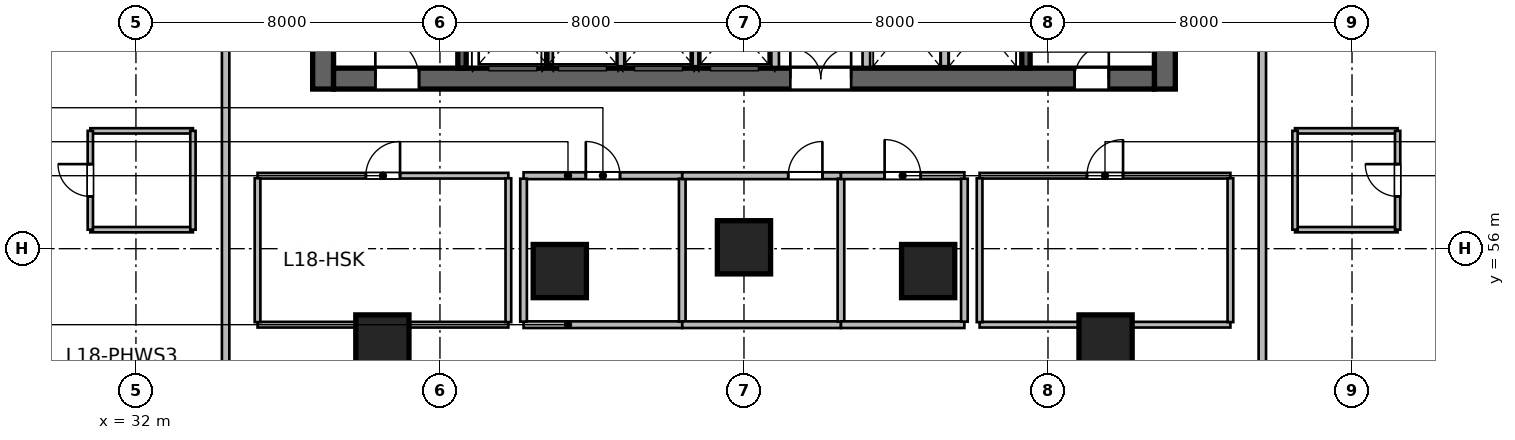
"""IFC4 building model, lengths in metres.
Left out: names, types, materials, properties, quantities, classifications, styles, units other than length and angle.
Written with IfcOpenShell. Run it as: python <this file> out.ifc"""

import sys

from ifc_helpers import new_model, si_unit, direction, frame, frame_2d, origin, origin_2d, place, context, subcontext, project, spatial, rectangle, circle, extrude, source, transform, mapped, element, fill, save


model = new_model("IFC4")
c1 = context("Model", 3, precision=1e-05, world=origin(), true_north=direction((0.0, 1.0)))
c2 = subcontext(c1, "Body", "Model", "MODEL_VIEW")
j1 = project(units=[si_unit("LENGTHUNIT", "METRE"), si_unit("PLANEANGLEUNIT", "RADIAN")], contexts=[c1])
p1 = place(None, origin())
s1 = spatial("IfcSite", under=j1, at=p1, CompositionType="ELEMENT")
p2 = place(p1, origin())
s2 = spatial("IfcBuilding", under=s1, at=p2, CompositionType="ELEMENT")
p3 = place(p2, frame((0.0, 0.0, 78.6)))
s3 = spatial("IfcBuildingStorey", under=s2, at=p3, CompositionType="ELEMENT", Elevation=78.6)
m1 = source(origin(), c2, "Body", "SweptSolid", [
    extrude(rectangle(XDim=12.0, YDim=0.55, at=frame_2d((6.0, 0.0))), origin(), (0.0, 0.0, 1.0), 3.6),
])
for number, where, z_axis, x_axis in (
    (1, (36.925, 60.2, 0.0), (0.0, 0.0, 1.0), (0.0, 1.0, 0.0)),
    (2, (59.075, 60.2, 0.0), (0.0, 0.0, 1.0), (0.0, 1.0, 0.0)),
):
    element("IfcWall", number, at=place(p3, frame(where, z_axis=z_axis, x_axis=x_axis)), inside=s3, PredefinedType="SHEAR", context=c2, shape_type="MappedRepresentation", body=[
        mapped(m1, transform((0.0, 0.0, 0.0), scale=1.0)),
    ])
m2 = source(origin(), c2, "Body", "SweptSolid", [
    extrude(rectangle(XDim=21.6, YDim=0.55, at=frame_2d((10.8, 0.0))), origin(), (0.0, 0.0, 1.0), 3.6),
])
p4 = place(p3, frame((37.2, 60.475, 0.0), z_axis=(0.0, 0.0, 1.0), x_axis=(1.0, 0.0, 0.0)))
e3 = element("IfcWall", 3, at=p4, inside=s3, PredefinedType="SHEAR", context=c2, shape_type="MappedRepresentation", body=[
    mapped(m2, transform((0.0, 0.0, 0.0), scale=1.0)),
])
p5 = place(p4, frame((1.1, 0.0, 0.0)))
e4 = element("IfcOpeningElement", 4, at=p5, cuts=e3, PredefinedType="OPENING", context=c2, shape_type="SweptSolid", body=[
    extrude(rectangle(XDim=1.15, YDim=2.15, at=frame_2d((0.575, 1.075))), frame((0.0, 0.285, 0.0), z_axis=(0.0, -1.0, 0.0), x_axis=(1.0, 0.0, 0.0)), (0.0, 0.0, 1.0), 0.57),
])
p6 = place(p4, frame((19.5, 0.0, 0.0)))
e5 = element("IfcOpeningElement", 5, at=p6, cuts=e3, PredefinedType="OPENING", context=c2, shape_type="SweptSolid", body=[
    extrude(rectangle(XDim=0.9, YDim=2.1, at=frame_2d((0.45, 1.05))), frame((0.0, 0.285, 0.0), z_axis=(0.0, -1.0, 0.0), x_axis=(1.0, 0.0, 0.0)), (0.0, 0.0, 1.0), 0.57),
])
p7 = place(p4, frame((12.02, 0.0, 0.0)))
e6 = element("IfcOpeningElement", 6, at=p7, cuts=e3, PredefinedType="OPENING", context=c2, shape_type="SweptSolid", body=[
    extrude(rectangle(XDim=1.6, YDim=2.15, at=frame_2d((0.8, 1.075))), frame((0.0, 0.285, 0.0), z_axis=(0.0, -1.0, 0.0), x_axis=(1.0, 0.0, 0.0)), (0.0, 0.0, 1.0), 0.57),
])
m3 = source(origin(), c2, "Body", "SweptSolid", [
    extrude(rectangle(XDim=10.9, YDim=0.22, at=frame_2d((5.45, 0.0))), origin(), (0.0, 0.0, 1.0), 3.6),
])
p8 = place(p3, frame((40.58, 60.75, 0.0), z_axis=(0.0, 0.0, 1.0), x_axis=(0.0, 1.0, 0.0)))
e7 = element("IfcWall", 7, at=p8, inside=s3, PredefinedType="SHEAR", context=c2, shape_type="MappedRepresentation", body=[
    mapped(m3, transform((0.0, 0.0, 0.0), scale=1.0)),
])
p9 = place(p3, frame((55.42, 60.75, 0.0), z_axis=(0.0, 0.0, 1.0), x_axis=(0.0, 1.0, 0.0)))
e8 = element("IfcWall", 8, at=p9, inside=s3, PredefinedType="SHEAR", context=c2, shape_type="MappedRepresentation", body=[
    mapped(m3, transform((0.0, 0.0, 0.0), scale=1.0)),
])
p10 = place(p9, frame((9.495, 0.0, 0.0)))
e9 = element("IfcOpeningElement", 9, at=p10, cuts=e8, PredefinedType="OPENING", context=c2, shape_type="SweptSolid", body=[
    extrude(rectangle(XDim=1.15, YDim=2.15, at=frame_2d((0.575, 1.075))), frame((0.0, 0.12, 0.0), z_axis=(0.0, -1.0, 0.0), x_axis=(1.0, 0.0, 0.0)), (0.0, 0.0, 1.0), 0.24),
])
m4 = source(origin(), c2, "Body", "SweptSolid", [
    extrude(circle(Radius=0.7, at=origin_2d()), origin(), (0.0, 0.0, 1.0), 3.6),
])
for number, where, z_axis, x_axis in (
    (10, (38.485, 53.558, 0.0), (0.0, 0.0, 1.0), (-0.289, 0.957, 0.0)),
    (11, (43.154, 55.411, 0.0), (0.0, 0.0, 1.0), (-0.143, 0.99, 0.0)),
    (12, (48.0, 56.036, 0.0), (0.0, 0.0, 1.0), (0.0, 1.0, 0.0)),
    (13, (52.846, 55.411, 0.0), (0.0, 0.0, 1.0), (0.143, 0.99, 0.0)),
    (14, (57.515, 53.558, 0.0), (0.0, 0.0, 1.0), (0.289, 0.957, 0.0)),
):
    element("IfcColumn", number, at=place(p3, frame(where, z_axis=z_axis, x_axis=x_axis)), inside=s3, PredefinedType="COLUMN", context=c2, shape_type="MappedRepresentation", body=[
        mapped(m4, transform((0.0, 0.0, 0.0), scale=1.0)),
    ])
m5 = source(origin(), c2, "Body", "SweptSolid", [
    extrude(rectangle(XDim=2.24, YDim=0.2, at=frame_2d((1.12, 0.0))), origin(), (0.0, 0.0, 1.0), 3.36),
])
for number, where, z_axis, x_axis in (
    (15, (48.82, 60.78, 0.0), (0.0, 0.0, 1.0), (0.0, 1.0, 0.0)),
    (16, (51.22, 60.78, 0.0), (0.0, 0.0, 1.0), (0.0, 1.0, 0.0)),
):
    element("IfcWall", number, at=place(p3, frame(where, z_axis=z_axis, x_axis=x_axis)), inside=s3, PredefinedType="SOLIDWALL", context=c2, shape_type="MappedRepresentation", body=[
        mapped(m5, transform((0.0, 0.0, 0.0), scale=1.0)),
    ])
m6 = source(origin(), c2, "Body", "SweptSolid", [
    extrude(rectangle(XDim=2.2, YDim=0.2, at=frame_2d((1.1, 0.0))), origin(), (0.0, 0.0, 1.0), 3.36),
])
for number, where, z_axis, x_axis in (
    (17, (42.87, 60.8, 0.0), (0.0, 0.0, 1.0), (0.0, 1.0, 0.0)),
    (18, (44.77, 60.8, 0.0), (0.0, 0.0, 1.0), (0.0, 1.0, 0.0)),
    (19, (46.7, 60.8, 0.0), (0.0, 0.0, 1.0), (0.0, 1.0, 0.0)),
    (20, (53.28, 60.8, 0.0), (0.0, 0.0, 1.0), (0.0, 1.0, 0.0)),
):
    element("IfcWall", number, at=place(p3, frame(where, z_axis=z_axis, x_axis=x_axis)), inside=s3, PredefinedType="SOLIDWALL", context=c2, shape_type="MappedRepresentation", body=[
        mapped(m6, transform((0.0, 0.0, 0.0), scale=1.0)),
    ])
m7 = source(origin(), c2, "Body", "SweptSolid", [
    extrude(rectangle(XDim=6.6, YDim=0.15, at=frame_2d((3.3, 0.0))), origin(), (0.0, 0.0, 1.0), 2.803),
])
p11 = place(p3, frame((35.2, 54.0, 0.0), z_axis=(0.0, 0.0, 1.0), x_axis=(1.0, 0.0, 0.0)))
e21 = element("IfcWall", 21, at=p11, inside=s3, PredefinedType="PARTITIONING", context=c2, shape_type="MappedRepresentation", body=[
    mapped(m7, transform((0.0, 0.0, 0.0), scale=1.0)),
])
m8 = source(origin(), c2, "Body", "SweptSolid", [
    extrude(rectangle(XDim=6.6, YDim=0.15, at=frame_2d((3.3, 0.0))), origin(), (0.0, 0.0, 1.0), 3.36),
])
p12 = place(p3, frame((35.2, 57.92, 0.0), z_axis=(0.0, 0.0, 1.0), x_axis=(1.0, 0.0, 0.0)))
e22 = element("IfcWall", 22, at=p12, inside=s3, PredefinedType="PARTITIONING", context=c2, shape_type="MappedRepresentation", body=[
    mapped(m8, transform((0.0, 0.0, 0.0), scale=1.0)),
])
p13 = place(p12, frame((2.85, 0.0, 0.0)))
e23 = element("IfcOpeningElement", 23, at=p13, cuts=e22, PredefinedType="OPENING", context=c2, shape_type="SweptSolid", body=[
    extrude(rectangle(XDim=0.9, YDim=2.1, at=frame_2d((0.45, 1.05))), frame((0.0, 0.085, 0.0), z_axis=(0.0, -1.0, 0.0), x_axis=(1.0, 0.0, 0.0)), (0.0, 0.0, 1.0), 0.17),
])
m9 = source(origin(), c2, "Body", "SweptSolid", [
    extrude(rectangle(XDim=3.785, YDim=0.15, at=frame_2d((1.893, 0.0))), origin(), (0.0, 0.0, 1.0), 3.36),
])
for number, where, z_axis, x_axis in (
    (24, (35.2, 54.067, 0.0), (0.0, 0.0, 1.0), (0.0, 1.0, 0.0)),
    (25, (41.8, 54.067, 0.0), (0.0, 0.0, 1.0), (0.0, 1.0, 0.0)),
):
    element("IfcWall", number, at=place(p3, frame(where, z_axis=z_axis, x_axis=x_axis)), inside=s3, PredefinedType="PARTITIONING", context=c2, shape_type="MappedRepresentation", body=[
        mapped(m9, transform((0.0, 0.0, 0.0), scale=1.0)),
    ])
m10 = source(origin(), c2, "Body", "SweptSolid", [
    extrude(rectangle(XDim=4.176, YDim=0.175, at=frame_2d((2.088, 0.0))), origin(), (0.0, 0.0, 1.0), 3.36),
])
p14 = place(p3, frame((42.2, 54.0, 0.0), z_axis=(0.0, 0.0, 1.0), x_axis=(1.0, 0.0, 0.0)))
e26 = element("IfcWall", 26, at=p14, inside=s3, PredefinedType="PARTITIONING", context=c2, shape_type="MappedRepresentation", body=[
    mapped(m10, transform((0.0, 0.0, 0.0), scale=1.0)),
])
m11 = source(origin(), c2, "Body", "SweptSolid", [
    extrude(rectangle(XDim=4.176, YDim=0.18, at=frame_2d((2.088, 0.0))), origin(), (0.0, 0.0, 1.0), 3.36),
])
p15 = place(p3, frame((42.2, 57.92, 0.0), z_axis=(0.0, 0.0, 1.0), x_axis=(1.0, 0.0, 0.0)))
e27 = element("IfcWall", 27, at=p15, inside=s3, PredefinedType="PLUMBINGWALL", context=c2, shape_type="MappedRepresentation", body=[
    mapped(m11, transform((0.0, 0.0, 0.0), scale=1.0)),
])
p16 = place(p15, frame((1.638, 0.0, 0.0)))
e28 = element("IfcOpeningElement", 28, at=p16, cuts=e27, PredefinedType="OPENING", context=c2, shape_type="SweptSolid", body=[
    extrude(rectangle(XDim=0.9, YDim=2.08, at=frame_2d((0.45, 1.04))), frame((0.0, 0.1, 0.0), z_axis=(0.0, -1.0, 0.0), x_axis=(1.0, 0.0, 0.0)), (0.0, 0.0, 1.0), 0.2),
])
m12 = source(origin(), c2, "Body", "SweptSolid", [
    extrude(rectangle(XDim=3.763, YDim=0.175, at=frame_2d((1.881, 0.0))), origin(), (0.0, 0.0, 1.0), 3.36),
])
for number, where, z_axis, x_axis in (
    (29, (42.2, 54.079, 0.0), (0.0, 0.0, 1.0), (0.0, 1.0, 0.0)),
    (30, (46.376, 54.079, 0.0), (0.0, 0.0, 1.0), (0.0, 1.0, 0.0)),
):
    element("IfcWall", number, at=place(p3, frame(where, z_axis=z_axis, x_axis=x_axis)), inside=s3, PredefinedType="PARTITIONING", context=c2, shape_type="MappedRepresentation", body=[
        mapped(m12, transform((0.0, 0.0, 0.0), scale=1.0)),
    ])
p17 = place(p3, frame((46.376, 54.0, 0.0), z_axis=(0.0, 0.0, 1.0), x_axis=(1.0, 0.0, 0.0)))
e31 = element("IfcWall", 31, at=p17, inside=s3, PredefinedType="PARTITIONING", context=c2, shape_type="MappedRepresentation", body=[
    mapped(m10, transform((0.0, 0.0, 0.0), scale=1.0)),
])
p18 = place(p3, frame((46.376, 57.92, 0.0), z_axis=(0.0, 0.0, 1.0), x_axis=(1.0, 0.0, 0.0)))
e32 = element("IfcWall", 32, at=p18, inside=s3, PredefinedType="PLUMBINGWALL", context=c2, shape_type="MappedRepresentation", body=[
    mapped(m11, transform((0.0, 0.0, 0.0), scale=1.0)),
])
p19 = place(p18, frame((2.788, 0.0, 0.0)))
e33 = element("IfcOpeningElement", 33, at=p19, cuts=e32, PredefinedType="OPENING", context=c2, shape_type="SweptSolid", body=[
    extrude(rectangle(XDim=0.9, YDim=2.08, at=frame_2d((0.45, 1.04))), frame((0.0, 0.1, 0.0), z_axis=(0.0, -1.0, 0.0), x_axis=(1.0, 0.0, 0.0)), (0.0, 0.0, 1.0), 0.2),
])
p20 = place(p3, frame((50.552, 54.079, 0.0), z_axis=(0.0, 0.0, 1.0), x_axis=(0.0, 1.0, 0.0)))
e34 = element("IfcWall", 34, at=p20, inside=s3, PredefinedType="PARTITIONING", context=c2, shape_type="MappedRepresentation", body=[
    mapped(m12, transform((0.0, 0.0, 0.0), scale=1.0)),
])
m13 = source(origin(), c2, "Body", "SweptSolid", [
    extrude(rectangle(XDim=3.248, YDim=0.175, at=frame_2d((1.624, 0.0))), origin(), (0.0, 0.0, 1.0), 3.36),
])
p21 = place(p3, frame((50.552, 54.0, 0.0), z_axis=(0.0, 0.0, 1.0), x_axis=(1.0, 0.0, 0.0)))
e35 = element("IfcWall", 35, at=p21, inside=s3, PredefinedType="PARTITIONING", context=c2, shape_type="MappedRepresentation", body=[
    mapped(m13, transform((0.0, 0.0, 0.0), scale=1.0)),
])
m14 = source(origin(), c2, "Body", "SweptSolid", [
    extrude(rectangle(XDim=3.248, YDim=0.18, at=frame_2d((1.624, 0.0))), origin(), (0.0, 0.0, 1.0), 3.36),
])
p22 = place(p3, frame((50.552, 57.92, 0.0), z_axis=(0.0, 0.0, 1.0), x_axis=(1.0, 0.0, 0.0)))
e36 = element("IfcWall", 36, at=p22, inside=s3, PredefinedType="PLUMBINGWALL", context=c2, shape_type="MappedRepresentation", body=[
    mapped(m14, transform((0.0, 0.0, 0.0), scale=1.0)),
])
p23 = place(p22, frame((1.149, 0.0, 0.0)))
e37 = element("IfcOpeningElement", 37, at=p23, cuts=e36, PredefinedType="OPENING", context=c2, shape_type="SweptSolid", body=[
    extrude(rectangle(XDim=0.95, YDim=2.12, at=frame_2d((0.475, 1.06))), frame((0.0, 0.1, 0.0), z_axis=(0.0, -1.0, 0.0), x_axis=(1.0, 0.0, 0.0)), (0.0, 0.0, 1.0), 0.2),
])
p24 = place(p3, frame((53.8, 54.079, 0.0), z_axis=(0.0, 0.0, 1.0), x_axis=(0.0, 1.0, 0.0)))
e38 = element("IfcWall", 38, at=p24, inside=s3, PredefinedType="PARTITIONING", context=c2, shape_type="MappedRepresentation", body=[
    mapped(m12, transform((0.0, 0.0, 0.0), scale=1.0)),
])
p25 = place(p3, frame((54.2, 54.0, 0.0), z_axis=(0.0, 0.0, 1.0), x_axis=(1.0, 0.0, 0.0)))
e39 = element("IfcWall", 39, at=p25, inside=s3, PredefinedType="PARTITIONING", context=c2, shape_type="MappedRepresentation", body=[
    mapped(m7, transform((0.0, 0.0, 0.0), scale=1.0)),
])
p26 = place(p3, frame((54.2, 57.92, 0.0), z_axis=(0.0, 0.0, 1.0), x_axis=(1.0, 0.0, 0.0)))
e40 = element("IfcWall", 40, at=p26, inside=s3, PredefinedType="PARTITIONING", context=c2, shape_type="MappedRepresentation", body=[
    mapped(m8, transform((0.0, 0.0, 0.0), scale=1.0)),
])
p27 = place(p26, frame((2.825, 0.0, 0.0)))
e41 = element("IfcOpeningElement", 41, at=p27, cuts=e40, PredefinedType="OPENING", context=c2, shape_type="SweptSolid", body=[
    extrude(rectangle(XDim=0.95, YDim=2.1, at=frame_2d((0.475, 1.05))), frame((0.0, 0.085, 0.0), z_axis=(0.0, -1.0, 0.0), x_axis=(1.0, 0.0, 0.0)), (0.0, 0.0, 1.0), 0.17),
])
for number, where, z_axis, x_axis in (
    (42, (54.2, 54.067, 0.0), (0.0, 0.0, 1.0), (0.0, 1.0, 0.0)),
    (43, (60.8, 54.067, 0.0), (0.0, 0.0, 1.0), (0.0, 1.0, 0.0)),
):
    element("IfcWall", number, at=place(p3, frame(where, z_axis=z_axis, x_axis=x_axis)), inside=s3, PredefinedType="PARTITIONING", context=c2, shape_type="MappedRepresentation", body=[
        mapped(m9, transform((0.0, 0.0, 0.0), scale=1.0)),
    ])
m15 = source(origin(), c2, "Body", "SweptSolid", [
    extrude(rectangle(XDim=16.134, YDim=0.195, at=frame_2d((8.067, 0.0))), origin(), (0.0, 0.0, 1.0), 3.36),
])
p28 = place(p3, frame((34.36, 45.326, 0.0), z_axis=(0.0, 0.0, 1.0), x_axis=(0.0, 1.0, 0.0)))
e44 = element("IfcWall", 44, at=p28, inside=s3, PredefinedType="PARTITIONING", context=c2, shape_type="MappedRepresentation", body=[
    mapped(m15, transform((0.0, 0.0, 0.0), scale=1.0)),
])
m16 = source(origin(), c2, "Body", "SweptSolid", [
    extrude(rectangle(XDim=16.134, YDim=0.195, at=frame_2d((8.067, 0.0))), origin(), (0.0, 0.0, 1.0), 2.644),
])
p29 = place(p3, frame((61.64, 45.326, 0.0), z_axis=(0.0, 0.0, 1.0), x_axis=(0.0, 1.0, 0.0)))
e45 = element("IfcWall", 45, at=p29, inside=s3, PredefinedType="PARTITIONING", context=c2, shape_type="MappedRepresentation", body=[
    mapped(m16, transform((0.0, 0.0, 0.0), scale=1.0)),
])
m17 = source(origin(), c2, "Body", "SweptSolid", [
    extrude(rectangle(XDim=2.7, YDim=0.14, at=frame_2d((1.35, 0.0))), origin(), (0.0, 0.0, 1.0), 3.36),
])
for number, where, z_axis, x_axis in (
    (46, (30.8, 59.1, 0.0), (0.0, 0.0, 1.0), (1.0, 0.0, 0.0)),
    (47, (30.8, 56.5, 0.0), (0.0, 0.0, 1.0), (1.0, 0.0, 0.0)),
):
    element("IfcWall", number, at=place(p3, frame(where, z_axis=z_axis, x_axis=x_axis)), inside=s3, PredefinedType="PARTITIONING", context=c2, shape_type="MappedRepresentation", body=[
        mapped(m17, transform((0.0, 0.0, 0.0), scale=1.0)),
    ])
m18 = source(origin(), c2, "Body", "SweptSolid", [
    extrude(rectangle(XDim=2.6, YDim=0.14, at=frame_2d((1.3, 0.0))), origin(), (0.0, 0.0, 1.0), 2.644),
])
p30 = place(p3, frame((30.8, 56.5, 0.0), z_axis=(0.0, 0.0, 1.0), x_axis=(0.0, 1.0, 0.0)))
e48 = element("IfcWall", 48, at=p30, inside=s3, PredefinedType="PARTITIONING", context=c2, shape_type="MappedRepresentation", body=[
    mapped(m18, transform((0.0, 0.0, 0.0), scale=1.0)),
])
p31 = place(p30, frame((0.875, 0.0, 0.0)))
e49 = element("IfcOpeningElement", 49, at=p31, cuts=e48, PredefinedType="OPENING", context=c2, shape_type="SweptSolid", body=[
    extrude(rectangle(XDim=0.85, YDim=2.05, at=frame_2d((0.425, 1.025))), frame((0.0, 0.08, 0.0), z_axis=(0.0, -1.0, 0.0), x_axis=(1.0, 0.0, 0.0)), (0.0, 0.0, 1.0), 0.16),
])
m19 = source(origin(), c2, "Body", "SweptSolid", [
    extrude(rectangle(XDim=2.6, YDim=0.14, at=frame_2d((1.3, 0.0))), origin(), (0.0, 0.0, 1.0), 3.36),
])
p32 = place(p3, frame((33.5, 56.5, 0.0), z_axis=(0.0, 0.0, 1.0), x_axis=(0.0, 1.0, 0.0)))
e50 = element("IfcWall", 50, at=p32, inside=s3, PredefinedType="PARTITIONING", context=c2, shape_type="MappedRepresentation", body=[
    mapped(m19, transform((0.0, 0.0, 0.0), scale=1.0)),
])
for number, where, z_axis, x_axis in (
    (51, (62.5, 59.1, 0.0), (0.0, 0.0, 1.0), (1.0, 0.0, 0.0)),
    (52, (62.5, 56.5, 0.0), (0.0, 0.0, 1.0), (1.0, 0.0, 0.0)),
):
    element("IfcWall", number, at=place(p3, frame(where, z_axis=z_axis, x_axis=x_axis)), inside=s3, PredefinedType="PARTITIONING", context=c2, shape_type="MappedRepresentation", body=[
        mapped(m17, transform((0.0, 0.0, 0.0), scale=1.0)),
    ])
p33 = place(p3, frame((62.5, 56.5, 0.0), z_axis=(0.0, 0.0, 1.0), x_axis=(0.0, 1.0, 0.0)))
e53 = element("IfcWall", 53, at=p33, inside=s3, PredefinedType="PARTITIONING", context=c2, shape_type="MappedRepresentation", body=[
    mapped(m19, transform((0.0, 0.0, 0.0), scale=1.0)),
])
p34 = place(p3, frame((65.2, 56.5, 0.0), z_axis=(0.0, 0.0, 1.0), x_axis=(0.0, 1.0, 0.0)))
e54 = element("IfcWall", 54, at=p34, inside=s3, PredefinedType="PARTITIONING", context=c2, shape_type="MappedRepresentation", body=[
    mapped(m19, transform((0.0, 0.0, 0.0), scale=1.0)),
])
p35 = place(p34, frame((0.875, 0.0, 0.0)))
e55 = element("IfcOpeningElement", 55, at=p35, cuts=e54, PredefinedType="OPENING", context=c2, shape_type="SweptSolid", body=[
    extrude(rectangle(XDim=0.85, YDim=2.05, at=frame_2d((0.425, 1.025))), frame((0.0, 0.08, 0.0), z_axis=(0.0, -1.0, 0.0), x_axis=(1.0, 0.0, 0.0)), (0.0, 0.0, 1.0), 0.16),
])
m20 = source(origin(), c2, "Body", "SweptSolid", [
    extrude(rectangle(XDim=1.15, YDim=2.15, at=frame_2d((0.575, 1.075))), frame((0.0, 0.025, 0.0), z_axis=(0.0, -1.0, 0.0), x_axis=(1.0, 0.0, 0.0)), (0.0, 0.0, 1.0), 0.05),
])
p36 = place(p5, origin())
e56 = element("IfcDoor", 56, at=p36, inside=s3, OperationType="SINGLE_SWING_LEFT", PredefinedType="DOOR", context=c2, shape_type="MappedRepresentation", body=[
    mapped(m20, transform((0.0, 0.0, 0.0), scale=1.0)),
])
fill(e4, e56)
m21 = source(origin(), c2, "Body", "SweptSolid", [
    extrude(rectangle(XDim=0.9, YDim=2.1, at=frame_2d((0.45, 1.05))), frame((0.0, 0.025, 0.0), z_axis=(0.0, -1.0, 0.0), x_axis=(1.0, 0.0, 0.0)), (0.0, 0.0, 1.0), 0.05),
])
p37 = place(p6, origin())
e57 = element("IfcDoor", 57, at=p37, inside=s3, OperationType="SINGLE_SWING_RIGHT", PredefinedType="DOOR", context=c2, shape_type="MappedRepresentation", body=[
    mapped(m21, transform((0.0, 0.0, 0.0), scale=1.0)),
])
fill(e5, e57)
m22 = source(origin(), c2, "Body", "SweptSolid", [
    extrude(rectangle(XDim=1.6, YDim=2.15, at=frame_2d((0.8, 1.075))), frame((0.0, 0.025, 0.0), z_axis=(0.0, -1.0, 0.0), x_axis=(1.0, 0.0, 0.0)), (0.0, 0.0, 1.0), 0.05),
])
p38 = place(p7, origin())
e58 = element("IfcDoor", 58, at=p38, inside=s3, OperationType="DOUBLE_DOOR_SINGLE_SWING", PredefinedType="DOOR", context=c2, shape_type="MappedRepresentation", body=[
    mapped(m22, transform((0.0, 0.0, 0.0), scale=1.0)),
])
fill(e6, e58)
p39 = place(p13, origin())
e59 = element("IfcDoor", 59, at=p39, inside=s3, OperationType="SINGLE_SWING_RIGHT", PredefinedType="DOOR", context=c2, shape_type="MappedRepresentation", body=[
    mapped(m21, transform((0.0, 0.0, 0.0), scale=1.0)),
])
fill(e23, e59)
m23 = source(origin(), c2, "Body", "SweptSolid", [
    extrude(rectangle(XDim=0.9, YDim=2.08, at=frame_2d((0.45, 1.04))), frame((0.0, 0.025, 0.0), z_axis=(0.0, -1.0, 0.0), x_axis=(1.0, 0.0, 0.0)), (0.0, 0.0, 1.0), 0.05),
])
p40 = place(p16, origin())
e60 = element("IfcDoor", 60, at=p40, inside=s3, OperationType="SINGLE_SWING_LEFT", PredefinedType="DOOR", context=c2, shape_type="MappedRepresentation", body=[
    mapped(m23, transform((0.0, 0.0, 0.0), scale=1.0)),
])
fill(e28, e60)
p41 = place(p19, origin())
e61 = element("IfcDoor", 61, at=p41, inside=s3, OperationType="SINGLE_SWING_RIGHT", PredefinedType="DOOR", context=c2, shape_type="MappedRepresentation", body=[
    mapped(m23, transform((0.0, 0.0, 0.0), scale=1.0)),
])
fill(e33, e61)
m24 = source(origin(), c2, "Body", "SweptSolid", [
    extrude(rectangle(XDim=0.95, YDim=2.12, at=frame_2d((0.475, 1.06))), frame((0.0, 0.025, 0.0), z_axis=(0.0, -1.0, 0.0), x_axis=(1.0, 0.0, 0.0)), (0.0, 0.0, 1.0), 0.05),
])
p42 = place(p23, origin())
e62 = element("IfcDoor", 62, at=p42, inside=s3, OperationType="SINGLE_SWING_LEFT", PredefinedType="DOOR", context=c2, shape_type="MappedRepresentation", body=[
    mapped(m24, transform((0.0, 0.0, 0.0), scale=1.0)),
])
fill(e37, e62)
m25 = source(origin(), c2, "Body", "SweptSolid", [
    extrude(rectangle(XDim=0.95, YDim=2.1, at=frame_2d((0.475, 1.05))), frame((0.0, 0.025, 0.0), z_axis=(0.0, -1.0, 0.0), x_axis=(1.0, 0.0, 0.0)), (0.0, 0.0, 1.0), 0.05),
])
p43 = place(p27, origin())
e63 = element("IfcDoor", 63, at=p43, inside=s3, OperationType="SINGLE_SWING_RIGHT", PredefinedType="DOOR", context=c2, shape_type="MappedRepresentation", body=[
    mapped(m25, transform((0.0, 0.0, 0.0), scale=1.0)),
])
fill(e41, e63)
m26 = source(origin(), c2, "Body", "SweptSolid", [
    extrude(rectangle(XDim=0.85, YDim=2.05, at=frame_2d((0.425, 1.025))), frame((0.0, 0.025, 0.0), z_axis=(0.0, -1.0, 0.0), x_axis=(1.0, 0.0, 0.0)), (0.0, 0.0, 1.0), 0.05),
])
p44 = place(p31, origin())
e64 = element("IfcDoor", 64, at=p44, inside=s3, OperationType="SINGLE_SWING_RIGHT", PredefinedType="DOOR", context=c2, shape_type="MappedRepresentation", body=[
    mapped(m26, transform((0.0, 0.0, 0.0), scale=1.0)),
])
fill(e49, e64)
p45 = place(p35, origin())
e65 = element("IfcDoor", 65, at=p45, inside=s3, OperationType="SINGLE_SWING_RIGHT", PredefinedType="DOOR", context=c2, shape_type="MappedRepresentation", body=[
    mapped(m26, transform((0.0, 0.0, 0.0), scale=1.0)),
])
fill(e55, e65)
save(model, sys.argv[1])
